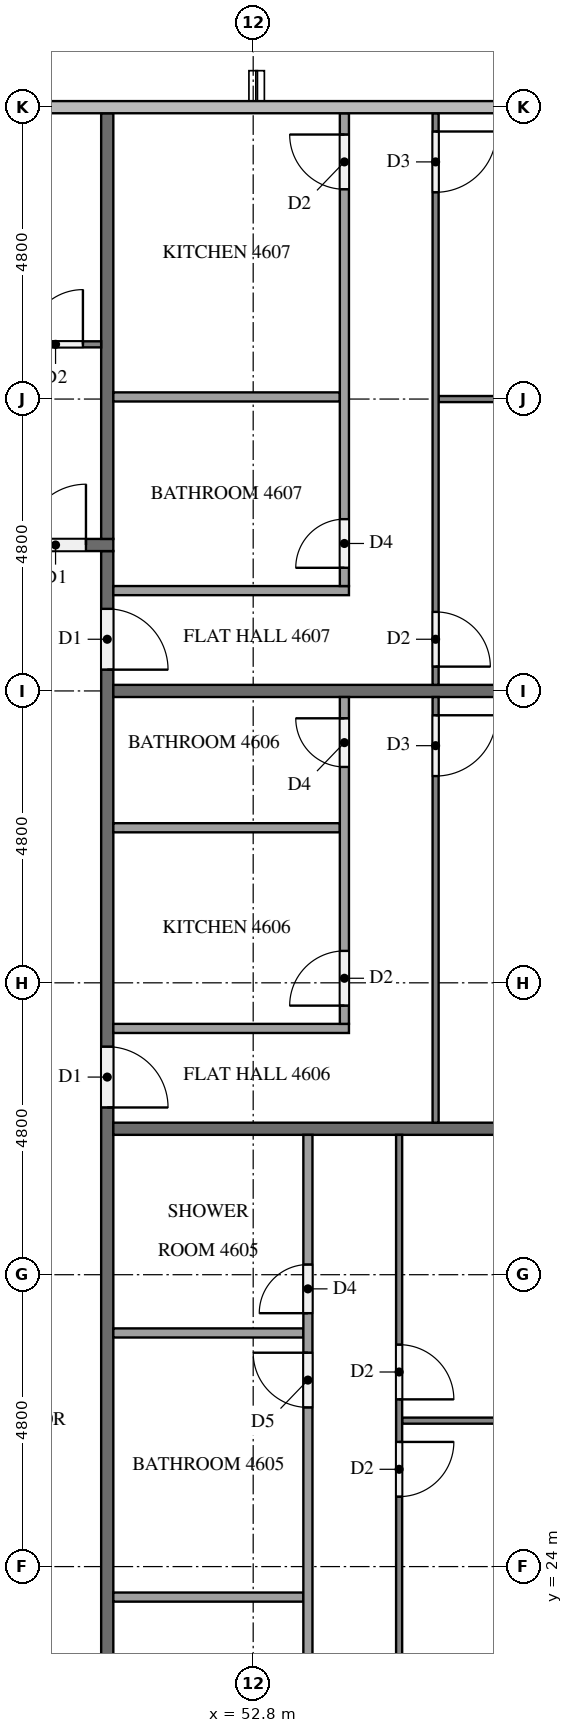
"""IFC4 building model, lengths in metres.
Left out: names, types, materials, properties, quantities, classifications, styles, units other than length and angle.
Written with IfcOpenShell. Run it as: python <this file> out.ifc"""

import sys

from ifc_helpers import new_model, si_unit, direction, frame, frame_2d, origin, place, context, subcontext, project, spatial, rectangle, extrude, element, fill, save


model = new_model("IFC4")
c1 = context("Model", 3, precision=1e-05, world=origin(), true_north=direction((0.0, 1.0)))
c2 = subcontext(c1, "Body", "Model", "MODEL_VIEW")
j1 = project(units=[si_unit("LENGTHUNIT", "METRE"), si_unit("PLANEANGLEUNIT", "RADIAN")], contexts=[c1])
p1 = place(None, origin())
s1 = spatial("IfcSite", under=j1, at=p1, CompositionType="ELEMENT")
p2 = place(p1, origin())
s2 = spatial("IfcBuilding", under=s1, at=p2, CompositionType="ELEMENT")
p3 = place(p2, frame((0.0, 0.0, 178.9)))
s3 = spatial("IfcBuildingStorey", under=s2, at=p3, CompositionType="ELEMENT", Elevation=178.9)
p4 = place(p3, frame((50.4, 40.7, 0.0), z_axis=(0.0, 0.0, 1.0), x_axis=(0.0, -1.0, 0.0)))
e1 = element("IfcWall", 1, at=p4, inside=s3, PredefinedType="PARTITIONING", context=c2, shape_type="SweptSolid", body=[
    extrude(rectangle(XDim=28.6, YDim=0.2, at=frame_2d((14.3, 0.0))), origin(), (0.0, 0.0, 1.0), 3.2),
])
p5 = place(p4, frame((27.3, 0.0, 0.0)))
e2 = element("IfcOpeningElement", 2, at=p5, cuts=e1, PredefinedType="OPENING", context=c2, shape_type="SweptSolid", body=[
    extrude(rectangle(XDim=1.1, YDim=2.1, at=frame_2d((0.55, 1.05))), frame((0.0, 0.11, 0.0), z_axis=(0.0, -1.0, 0.0), x_axis=(1.0, 0.0, 0.0)), (0.0, 0.0, 1.0), 0.22),
])
p6 = place(p4, frame((8.15, 0.0, 0.0)))
e3 = element("IfcOpeningElement", 3, at=p6, cuts=e1, PredefinedType="OPENING", context=c2, shape_type="SweptSolid", body=[
    extrude(rectangle(XDim=1.0, YDim=2.1, at=frame_2d((0.5, 1.05))), frame((0.0, 0.11, 0.0), z_axis=(0.0, -1.0, 0.0), x_axis=(1.0, 0.0, 0.0)), (0.0, 0.0, 1.0), 0.22),
])
p7 = place(p4, frame((0.95, 0.0, 0.0)))
e4 = element("IfcOpeningElement", 4, at=p7, cuts=e1, PredefinedType="OPENING", context=c2, shape_type="SweptSolid", body=[
    extrude(rectangle(XDim=1.0, YDim=2.1, at=frame_2d((0.5, 1.05))), frame((0.0, 0.11, 0.0), z_axis=(0.0, -1.0, 0.0), x_axis=(1.0, 0.0, 0.0)), (0.0, 0.0, 1.0), 0.22),
])
p8 = place(p3, frame((11.9, 40.8, 0.0), z_axis=(0.0, 0.0, 1.0), x_axis=(1.0, 0.0, 0.0)))
e5 = element("IfcWall", 5, at=p8, inside=s3, PredefinedType="PARTITIONING", context=c2, shape_type="SweptSolid", body=[
    extrude(rectangle(XDim=38.6, YDim=0.2, at=frame_2d((19.3, 0.0))), origin(), (0.0, 0.0, 1.0), 3.2),
])
p9 = place(p8, frame((37.15, 0.0, 0.0)))
e6 = element("IfcOpeningElement", 6, at=p9, cuts=e5, PredefinedType="OPENING", context=c2, shape_type="SweptSolid", body=[
    extrude(rectangle(XDim=1.0, YDim=2.1, at=frame_2d((0.5, 1.05))), frame((0.0, 0.11, 0.0), z_axis=(0.0, -1.0, 0.0), x_axis=(1.0, 0.0, 0.0)), (0.0, 0.0, 1.0), 0.22),
])
p10 = place(p8, frame((20.35, 0.0, 0.0)))
e7 = element("IfcOpeningElement", 7, at=p10, cuts=e5, PredefinedType="OPENING", context=c2, shape_type="SweptSolid", body=[
    extrude(rectangle(XDim=1.0, YDim=2.1, at=frame_2d((0.5, 1.05))), frame((0.0, 0.11, 0.0), z_axis=(0.0, -1.0, 0.0), x_axis=(1.0, 0.0, 0.0)), (0.0, 0.0, 1.0), 0.22),
])
p11 = place(p8, frame((13.15, 0.0, 0.0)))
e8 = element("IfcOpeningElement", 8, at=p11, cuts=e5, PredefinedType="OPENING", context=c2, shape_type="SweptSolid", body=[
    extrude(rectangle(XDim=1.0, YDim=2.1, at=frame_2d((0.5, 1.05))), frame((0.0, 0.11, 0.0), z_axis=(0.0, -1.0, 0.0), x_axis=(1.0, 0.0, 0.0)), (0.0, 0.0, 1.0), 0.22),
])
for number, where, z_axis, x_axis in (
    (9, (50.5, 31.2, 0.0), (0.0, 0.0, 1.0), (1.0, 0.0, 0.0)),
    (10, (50.5, 38.4, 0.0), (0.0, 0.0, 1.0), (1.0, 0.0, 0.0)),
):
    element("IfcWall", number, at=place(p3, frame(where, z_axis=z_axis, x_axis=x_axis)), inside=s3, PredefinedType="PARTITIONING", context=c2, shape_type="SweptSolid", body=[
        extrude(rectangle(XDim=11.8, YDim=0.2, at=frame_2d((5.9, 0.0))), origin(), (0.0, 0.0, 1.0), 3.2),
    ])
p12 = place(p3, frame((50.4, 40.9, 0.0), z_axis=(0.0, 0.0, 1.0), x_axis=(0.0, 1.0, 0.0)))
e11 = element("IfcWall", 11, at=p12, inside=s3, PredefinedType="PARTITIONING", context=c2, shape_type="SweptSolid", body=[
    extrude(rectangle(XDim=7.0, YDim=0.2, at=frame_2d((3.5, 0.0))), origin(), (0.0, 0.0, 1.0), 3.2),
])
p13 = place(p3, frame((55.25, 26.4, 0.0), z_axis=(0.0, 0.0, 1.0), x_axis=(1.0, 0.0, 0.0)))
e12 = element("IfcWall", 12, at=p13, inside=s3, PredefinedType="PARTITIONING", context=c2, shape_type="SweptSolid", body=[
    extrude(rectangle(XDim=7.05, YDim=0.1, at=frame_2d((3.525, 0.0))), origin(), (0.0, 0.0, 1.0), 3.2),
])
p14 = place(p3, frame((55.2, 31.1, 0.0), z_axis=(0.0, 0.0, 1.0), x_axis=(0.0, -1.0, 0.0)))
e13 = element("IfcWall", 13, at=p14, inside=s3, PredefinedType="PARTITIONING", context=c2, shape_type="SweptSolid", body=[
    extrude(rectangle(XDim=19.0, YDim=0.1, at=frame_2d((9.5, 0.0))), origin(), (0.0, 0.0, 1.0), 3.2),
])
p15 = place(p14, frame((14.65, 0.0, 0.0)))
e14 = element("IfcOpeningElement", 14, at=p15, cuts=e13, PredefinedType="OPENING", context=c2, shape_type="SweptSolid", body=[
    extrude(rectangle(XDim=0.9, YDim=2.1, at=frame_2d((0.45, 1.05))), frame((0.0, 0.06, 0.0), z_axis=(0.0, -1.0, 0.0), x_axis=(1.0, 0.0, 0.0)), (0.0, 0.0, 1.0), 0.12),
])
p16 = place(p14, frame((12.95, 0.0, 0.0)))
e15 = element("IfcOpeningElement", 15, at=p16, cuts=e13, PredefinedType="OPENING", context=c2, shape_type="SweptSolid", body=[
    extrude(rectangle(XDim=1.0, YDim=2.1, at=frame_2d((0.5, 1.05))), frame((0.0, 0.06, 0.0), z_axis=(0.0, -1.0, 0.0), x_axis=(1.0, 0.0, 0.0)), (0.0, 0.0, 1.0), 0.12),
])
p17 = place(p14, frame((5.05, 0.0, 0.0)))
e16 = element("IfcOpeningElement", 16, at=p17, cuts=e13, PredefinedType="OPENING", context=c2, shape_type="SweptSolid", body=[
    extrude(rectangle(XDim=0.9, YDim=2.1, at=frame_2d((0.45, 1.05))), frame((0.0, 0.06, 0.0), z_axis=(0.0, -1.0, 0.0), x_axis=(1.0, 0.0, 0.0)), (0.0, 0.0, 1.0), 0.12),
])
p18 = place(p14, frame((3.45, 0.0, 0.0)))
e17 = element("IfcOpeningElement", 17, at=p18, cuts=e13, PredefinedType="OPENING", context=c2, shape_type="SweptSolid", body=[
    extrude(rectangle(XDim=0.9, YDim=2.1, at=frame_2d((0.45, 1.05))), frame((0.0, 0.06, 0.0), z_axis=(0.0, -1.0, 0.0), x_axis=(1.0, 0.0, 0.0)), (0.0, 0.0, 1.0), 0.12),
])
for number, where, z_axis, x_axis in (
    (18, (50.5, 23.498, 0.0), (0.0, 0.0, 1.0), (1.0, 0.0, 0.0)),
    (19, (50.5, 27.842, 0.0), (0.0, 0.0, 1.0), (1.0, 0.0, 0.0)),
):
    element("IfcWall", number, at=place(p3, frame(where, z_axis=z_axis, x_axis=x_axis)), inside=s3, PredefinedType="PARTITIONING", context=c2, shape_type="SweptSolid", body=[
        extrude(rectangle(XDim=3.125, YDim=0.15, at=frame_2d((1.562, 0.0))), origin(), (0.0, 0.0, 1.0), 3.2),
    ])
p19 = place(p3, frame((53.7, 13.725, 0.0), z_axis=(0.0, 0.0, 1.0), x_axis=(0.0, 1.0, 0.0)))
e20 = element("IfcWall", 20, at=p19, inside=s3, PredefinedType="PARTITIONING", context=c2, shape_type="SweptSolid", body=[
    extrude(rectangle(XDim=17.375, YDim=0.15, at=frame_2d((8.688, 0.0))), origin(), (0.0, 0.0, 1.0), 3.2),
])
p20 = place(p19, frame((2.133, 0.0, 0.0)))
e21 = element("IfcOpeningElement", 21, at=p20, cuts=e20, PredefinedType="OPENING", context=c2, shape_type="SweptSolid", body=[
    extrude(rectangle(XDim=0.8, YDim=2.1, at=frame_2d((0.4, 1.05))), frame((0.0, 0.085, 0.0), z_axis=(0.0, -1.0, 0.0), x_axis=(1.0, 0.0, 0.0)), (0.0, 0.0, 1.0), 0.17),
])
p21 = place(p19, frame((3.583, 0.0, 0.0)))
e22 = element("IfcOpeningElement", 22, at=p21, cuts=e20, PredefinedType="OPENING", context=c2, shape_type="SweptSolid", body=[
    extrude(rectangle(XDim=0.9, YDim=2.1, at=frame_2d((0.45, 1.05))), frame((0.0, 0.085, 0.0), z_axis=(0.0, -1.0, 0.0), x_axis=(1.0, 0.0, 0.0)), (0.0, 0.0, 1.0), 0.17),
])
p22 = place(p19, frame((12.892, 0.0, 0.0)))
e23 = element("IfcOpeningElement", 23, at=p22, cuts=e20, PredefinedType="OPENING", context=c2, shape_type="SweptSolid", body=[
    extrude(rectangle(XDim=0.9, YDim=2.1, at=frame_2d((0.45, 1.05))), frame((0.0, 0.085, 0.0), z_axis=(0.0, -1.0, 0.0), x_axis=(1.0, 0.0, 0.0)), (0.0, 0.0, 1.0), 0.17),
])
p23 = place(p19, frame((14.442, 0.0, 0.0)))
e24 = element("IfcOpeningElement", 24, at=p23, cuts=e20, PredefinedType="OPENING", context=c2, shape_type="SweptSolid", body=[
    extrude(rectangle(XDim=0.8, YDim=2.1, at=frame_2d((0.4, 1.05))), frame((0.0, 0.085, 0.0), z_axis=(0.0, -1.0, 0.0), x_axis=(1.0, 0.0, 0.0)), (0.0, 0.0, 1.0), 0.17),
])
p24 = place(p3, frame((55.8, 38.3, 0.0), z_axis=(0.0, 0.0, 1.0), x_axis=(0.0, -1.0, 0.0)))
e25 = element("IfcWall", 25, at=p24, inside=s3, PredefinedType="PARTITIONING", context=c2, shape_type="SweptSolid", body=[
    extrude(rectangle(XDim=7.0, YDim=0.1, at=frame_2d((3.5, 0.0))), origin(), (0.0, 0.0, 1.0), 3.2),
])
p25 = place(p24, frame((0.3, 0.0, 0.0)))
e26 = element("IfcOpeningElement", 26, at=p25, cuts=e25, PredefinedType="OPENING", context=c2, shape_type="SweptSolid", body=[
    extrude(rectangle(XDim=1.0, YDim=2.1, at=frame_2d((0.5, 1.05))), frame((0.0, 0.06, 0.0), z_axis=(0.0, -1.0, 0.0), x_axis=(1.0, 0.0, 0.0)), (0.0, 0.0, 1.0), 0.12),
])
p26 = place(p3, frame((50.5, 36.15, 0.0), z_axis=(0.0, 0.0, 1.0), x_axis=(1.0, 0.0, 0.0)))
e27 = element("IfcWall", 27, at=p26, inside=s3, PredefinedType="PARTITIONING", context=c2, shape_type="SweptSolid", body=[
    extrude(rectangle(XDim=3.725, YDim=0.15, at=frame_2d((1.863, 0.0))), origin(), (0.0, 0.0, 1.0), 3.2),
])
p27 = place(p3, frame((50.5, 32.85, 0.0), z_axis=(0.0, 0.0, 1.0), x_axis=(1.0, 0.0, 0.0)))
e28 = element("IfcWall", 28, at=p27, inside=s3, PredefinedType="PARTITIONING", context=c2, shape_type="SweptSolid", body=[
    extrude(rectangle(XDim=3.875, YDim=0.15, at=frame_2d((1.938, 0.0))), origin(), (0.0, 0.0, 1.0), 3.2),
])
p28 = place(p3, frame((54.3, 32.925, 0.0), z_axis=(0.0, 0.0, 1.0), x_axis=(0.0, 1.0, 0.0)))
e29 = element("IfcWall", 29, at=p28, inside=s3, PredefinedType="PARTITIONING", context=c2, shape_type="SweptSolid", body=[
    extrude(rectangle(XDim=5.375, YDim=0.15, at=frame_2d((2.688, 0.0))), origin(), (0.0, 0.0, 1.0), 3.2),
])
p29 = place(p28, frame((0.3, 0.0, 0.0)))
e30 = element("IfcOpeningElement", 30, at=p29, cuts=e29, PredefinedType="OPENING", context=c2, shape_type="SweptSolid", body=[
    extrude(rectangle(XDim=0.9, YDim=2.1, at=frame_2d((0.45, 1.05))), frame((0.0, 0.085, 0.0), z_axis=(0.0, -1.0, 0.0), x_axis=(1.0, 0.0, 0.0)), (0.0, 0.0, 1.0), 0.17),
])
p30 = place(p28, frame((4.225, 0.0, 0.0)))
e31 = element("IfcOpeningElement", 31, at=p30, cuts=e29, PredefinedType="OPENING", context=c2, shape_type="SweptSolid", body=[
    extrude(rectangle(XDim=0.8, YDim=2.1, at=frame_2d((0.4, 1.05))), frame((0.0, 0.085, 0.0), z_axis=(0.0, -1.0, 0.0), x_axis=(1.0, 0.0, 0.0)), (0.0, 0.0, 1.0), 0.17),
])
p31 = place(p3, frame((55.85, 43.2, 0.0), z_axis=(0.0, 0.0, 1.0), x_axis=(1.0, 0.0, 0.0)))
e32 = element("IfcWall", 32, at=p31, inside=s3, PredefinedType="PARTITIONING", context=c2, shape_type="SweptSolid", body=[
    extrude(rectangle(XDim=6.075, YDim=0.1, at=frame_2d((3.038, 0.0))), origin(), (0.0, 0.0, 1.0), 3.2),
])
p32 = place(p3, frame((55.8, 47.9, 0.0), z_axis=(0.0, 0.0, 1.0), x_axis=(0.0, -1.0, 0.0)))
e33 = element("IfcWall", 33, at=p32, inside=s3, PredefinedType="PARTITIONING", context=c2, shape_type="SweptSolid", body=[
    extrude(rectangle(XDim=9.4, YDim=0.1, at=frame_2d((4.7, 0.0))), origin(), (0.0, 0.0, 1.0), 3.2),
])
p33 = place(p32, frame((8.2, 0.0, 0.0)))
e34 = element("IfcOpeningElement", 34, at=p33, cuts=e33, PredefinedType="OPENING", context=c2, shape_type="SweptSolid", body=[
    extrude(rectangle(XDim=0.9, YDim=2.1, at=frame_2d((0.45, 1.05))), frame((0.0, 0.06, 0.0), z_axis=(0.0, -1.0, 0.0), x_axis=(1.0, 0.0, 0.0)), (0.0, 0.0, 1.0), 0.12),
])
p34 = place(p32, frame((0.3, 0.0, 0.0)))
e35 = element("IfcOpeningElement", 35, at=p34, cuts=e33, PredefinedType="OPENING", context=c2, shape_type="SweptSolid", body=[
    extrude(rectangle(XDim=1.0, YDim=2.1, at=frame_2d((0.5, 1.05))), frame((0.0, 0.06, 0.0), z_axis=(0.0, -1.0, 0.0), x_axis=(1.0, 0.0, 0.0)), (0.0, 0.0, 1.0), 0.12),
])
p35 = place(p3, frame((50.5, 43.235, 0.0), z_axis=(0.0, 0.0, 1.0), x_axis=(1.0, 0.0, 0.0)))
e36 = element("IfcWall", 36, at=p35, inside=s3, PredefinedType="PARTITIONING", context=c2, shape_type="SweptSolid", body=[
    extrude(rectangle(XDim=3.725, YDim=0.15, at=frame_2d((1.863, 0.0))), origin(), (0.0, 0.0, 1.0), 3.2),
])
p36 = place(p3, frame((50.5, 40.05, 0.0), z_axis=(0.0, 0.0, 1.0), x_axis=(1.0, 0.0, 0.0)))
e37 = element("IfcWall", 37, at=p36, inside=s3, PredefinedType="PARTITIONING", context=c2, shape_type="SweptSolid", body=[
    extrude(rectangle(XDim=3.875, YDim=0.15, at=frame_2d((1.938, 0.0))), origin(), (0.0, 0.0, 1.0), 3.2),
])
p37 = place(p3, frame((54.3, 40.125, 0.0), z_axis=(0.0, 0.0, 1.0), x_axis=(0.0, 1.0, 0.0)))
e38 = element("IfcWall", 38, at=p37, inside=s3, PredefinedType="PARTITIONING", context=c2, shape_type="SweptSolid", body=[
    extrude(rectangle(XDim=7.775, YDim=0.15, at=frame_2d((3.887, 0.0))), origin(), (0.0, 0.0, 1.0), 3.2),
])
p38 = place(p37, frame((0.3, 0.0, 0.0)))
e39 = element("IfcOpeningElement", 39, at=p38, cuts=e38, PredefinedType="OPENING", context=c2, shape_type="SweptSolid", body=[
    extrude(rectangle(XDim=0.8, YDim=2.1, at=frame_2d((0.4, 1.05))), frame((0.0, 0.085, 0.0), z_axis=(0.0, -1.0, 0.0), x_axis=(1.0, 0.0, 0.0)), (0.0, 0.0, 1.0), 0.17),
])
p39 = place(p37, frame((6.525, 0.0, 0.0)))
e40 = element("IfcOpeningElement", 40, at=p39, cuts=e38, PredefinedType="OPENING", context=c2, shape_type="SweptSolid", body=[
    extrude(rectangle(XDim=0.9, YDim=2.1, at=frame_2d((0.45, 1.05))), frame((0.0, 0.085, 0.0), z_axis=(0.0, -1.0, 0.0), x_axis=(1.0, 0.0, 0.0)), (0.0, 0.0, 1.0), 0.17),
])
p40 = place(p3, frame((33.7, 44.1, 0.0), z_axis=(0.0, 0.0, 1.0), x_axis=(1.0, 0.0, 0.0)))
e41 = element("IfcWall", 41, at=p40, inside=s3, PredefinedType="PARTITIONING", context=c2, shape_type="SweptSolid", body=[
    extrude(rectangle(XDim=16.6, YDim=0.1, at=frame_2d((8.3, 0.0))), origin(), (0.0, 0.0, 1.0), 3.2),
])
p41 = place(p40, frame((15.4, 0.0, 0.0)))
e42 = element("IfcOpeningElement", 42, at=p41, cuts=e41, PredefinedType="OPENING", context=c2, shape_type="SweptSolid", body=[
    extrude(rectangle(XDim=0.9, YDim=2.1, at=frame_2d((0.45, 1.05))), frame((0.0, 0.06, 0.0), z_axis=(0.0, -1.0, 0.0), x_axis=(1.0, 0.0, 0.0)), (0.0, 0.0, 1.0), 0.12),
])
p42 = place(p40, frame((7.45, 0.0, 0.0)))
e43 = element("IfcOpeningElement", 43, at=p42, cuts=e41, PredefinedType="OPENING", context=c2, shape_type="SweptSolid", body=[
    extrude(rectangle(XDim=0.9, YDim=2.1, at=frame_2d((0.45, 1.05))), frame((0.0, 0.06, 0.0), z_axis=(0.0, -1.0, 0.0), x_axis=(1.0, 0.0, 0.0)), (0.0, 0.0, 1.0), 0.12),
])
p43 = place(p40, frame((5.75, 0.0, 0.0)))
e44 = element("IfcOpeningElement", 44, at=p43, cuts=e41, PredefinedType="OPENING", context=c2, shape_type="SweptSolid", body=[
    extrude(rectangle(XDim=1.0, YDim=2.1, at=frame_2d((0.5, 1.05))), frame((0.0, 0.06, 0.0), z_axis=(0.0, -1.0, 0.0), x_axis=(1.0, 0.0, 0.0)), (0.0, 0.0, 1.0), 0.12),
])
p44 = place(p6, origin())
e45 = element("IfcDoor", 45, at=p44, inside=s3, OperationType="SINGLE_SWING_RIGHT", PredefinedType="DOOR", context=c2, shape_type="SweptSolid", body=[
    extrude(rectangle(XDim=1.0, YDim=2.1, at=frame_2d((0.5, 1.05))), frame((0.0, 0.025, 0.0), z_axis=(0.0, -1.0, 0.0), x_axis=(1.0, 0.0, 0.0)), (0.0, 0.0, 1.0), 0.05),
])
fill(e3, e45)
p45 = place(p7, origin())
e46 = element("IfcDoor", 46, at=p45, inside=s3, OperationType="SINGLE_SWING_RIGHT", PredefinedType="DOOR", context=c2, shape_type="SweptSolid", body=[
    extrude(rectangle(XDim=1.0, YDim=2.1, at=frame_2d((0.5, 1.05))), frame((0.0, 0.025, 0.0), z_axis=(0.0, -1.0, 0.0), x_axis=(1.0, 0.0, 0.0)), (0.0, 0.0, 1.0), 0.05),
])
fill(e4, e46)
p46 = place(p9, origin())
e47 = element("IfcDoor", 47, at=p46, inside=s3, OperationType="SINGLE_SWING_RIGHT", PredefinedType="DOOR", context=c2, shape_type="SweptSolid", body=[
    extrude(rectangle(XDim=1.0, YDim=2.1, at=frame_2d((0.5, 1.05))), frame((0.0, 0.025, 0.0), z_axis=(0.0, -1.0, 0.0), x_axis=(1.0, 0.0, 0.0)), (0.0, 0.0, 1.0), 0.05),
])
fill(e6, e47)
p47 = place(p17, origin())
e48 = element("IfcDoor", 48, at=p47, inside=s3, OperationType="SINGLE_SWING_LEFT", PredefinedType="DOOR", context=c2, shape_type="SweptSolid", body=[
    extrude(rectangle(XDim=0.9, YDim=2.1, at=frame_2d((0.45, 1.05))), frame((0.0, 0.025, 0.0), z_axis=(0.0, -1.0, 0.0), x_axis=(1.0, 0.0, 0.0)), (0.0, 0.0, 1.0), 0.05),
])
fill(e16, e48)
p48 = place(p18, origin())
e49 = element("IfcDoor", 49, at=p48, inside=s3, OperationType="SINGLE_SWING_RIGHT", PredefinedType="DOOR", context=c2, shape_type="SweptSolid", body=[
    extrude(rectangle(XDim=0.9, YDim=2.1, at=frame_2d((0.45, 1.05))), frame((0.0, 0.025, 0.0), z_axis=(0.0, -1.0, 0.0), x_axis=(1.0, 0.0, 0.0)), (0.0, 0.0, 1.0), 0.05),
])
fill(e17, e49)
p49 = place(p22, origin())
e50 = element("IfcDoor", 50, at=p49, inside=s3, OperationType="SINGLE_SWING_RIGHT", PredefinedType="DOOR", context=c2, shape_type="SweptSolid", body=[
    extrude(rectangle(XDim=0.9, YDim=2.1, at=frame_2d((0.45, 1.05))), frame((0.0, 0.025, 0.0), z_axis=(0.0, -1.0, 0.0), x_axis=(1.0, 0.0, 0.0)), (0.0, 0.0, 1.0), 0.05),
])
fill(e23, e50)
p50 = place(p23, origin())
e51 = element("IfcDoor", 51, at=p50, inside=s3, OperationType="SINGLE_SWING_LEFT", PredefinedType="DOOR", context=c2, shape_type="SweptSolid", body=[
    extrude(rectangle(XDim=0.8, YDim=2.1, at=frame_2d((0.4, 1.05))), frame((0.0, 0.025, 0.0), z_axis=(0.0, -1.0, 0.0), x_axis=(1.0, 0.0, 0.0)), (0.0, 0.0, 1.0), 0.05),
])
fill(e24, e51)
p51 = place(p25, origin())
e52 = element("IfcDoor", 52, at=p51, inside=s3, OperationType="SINGLE_SWING_LEFT", PredefinedType="DOOR", context=c2, shape_type="SweptSolid", body=[
    extrude(rectangle(XDim=1.0, YDim=2.1, at=frame_2d((0.5, 1.05))), frame((0.0, 0.025, 0.0), z_axis=(0.0, -1.0, 0.0), x_axis=(1.0, 0.0, 0.0)), (0.0, 0.0, 1.0), 0.05),
])
fill(e26, e52)
p52 = place(p29, origin())
e53 = element("IfcDoor", 53, at=p52, inside=s3, OperationType="SINGLE_SWING_LEFT", PredefinedType="DOOR", context=c2, shape_type="SweptSolid", body=[
    extrude(rectangle(XDim=0.9, YDim=2.1, at=frame_2d((0.45, 1.05))), frame((0.0, 0.025, 0.0), z_axis=(0.0, -1.0, 0.0), x_axis=(1.0, 0.0, 0.0)), (0.0, 0.0, 1.0), 0.05),
])
fill(e30, e53)
p53 = place(p30, origin())
e54 = element("IfcDoor", 54, at=p53, inside=s3, OperationType="SINGLE_SWING_RIGHT", PredefinedType="DOOR", context=c2, shape_type="SweptSolid", body=[
    extrude(rectangle(XDim=0.8, YDim=2.1, at=frame_2d((0.4, 1.05))), frame((0.0, 0.025, 0.0), z_axis=(0.0, -1.0, 0.0), x_axis=(1.0, 0.0, 0.0)), (0.0, 0.0, 1.0), 0.05),
])
fill(e31, e54)
p54 = place(p33, origin())
e55 = element("IfcDoor", 55, at=p54, inside=s3, OperationType="SINGLE_SWING_RIGHT", PredefinedType="DOOR", context=c2, shape_type="SweptSolid", body=[
    extrude(rectangle(XDim=0.9, YDim=2.1, at=frame_2d((0.45, 1.05))), frame((0.0, 0.025, 0.0), z_axis=(0.0, -1.0, 0.0), x_axis=(1.0, 0.0, 0.0)), (0.0, 0.0, 1.0), 0.05),
])
fill(e34, e55)
p55 = place(p34, origin())
e56 = element("IfcDoor", 56, at=p55, inside=s3, OperationType="SINGLE_SWING_LEFT", PredefinedType="DOOR", context=c2, shape_type="SweptSolid", body=[
    extrude(rectangle(XDim=1.0, YDim=2.1, at=frame_2d((0.5, 1.05))), frame((0.0, 0.025, 0.0), z_axis=(0.0, -1.0, 0.0), x_axis=(1.0, 0.0, 0.0)), (0.0, 0.0, 1.0), 0.05),
])
fill(e35, e56)
p56 = place(p38, origin())
e57 = element("IfcDoor", 57, at=p56, inside=s3, OperationType="SINGLE_SWING_LEFT", PredefinedType="DOOR", context=c2, shape_type="SweptSolid", body=[
    extrude(rectangle(XDim=0.8, YDim=2.1, at=frame_2d((0.4, 1.05))), frame((0.0, 0.025, 0.0), z_axis=(0.0, -1.0, 0.0), x_axis=(1.0, 0.0, 0.0)), (0.0, 0.0, 1.0), 0.05),
])
fill(e39, e57)
p57 = place(p39, origin())
e58 = element("IfcDoor", 58, at=p57, inside=s3, OperationType="SINGLE_SWING_RIGHT", PredefinedType="DOOR", context=c2, shape_type="SweptSolid", body=[
    extrude(rectangle(XDim=0.9, YDim=2.1, at=frame_2d((0.45, 1.05))), frame((0.0, 0.025, 0.0), z_axis=(0.0, -1.0, 0.0), x_axis=(1.0, 0.0, 0.0)), (0.0, 0.0, 1.0), 0.05),
])
fill(e40, e58)
p58 = place(p41, origin())
e59 = element("IfcDoor", 59, at=p58, inside=s3, OperationType="SINGLE_SWING_RIGHT", PredefinedType="DOOR", context=c2, shape_type="SweptSolid", body=[
    extrude(rectangle(XDim=0.9, YDim=2.1, at=frame_2d((0.45, 1.05))), frame((0.0, 0.025, 0.0), z_axis=(0.0, -1.0, 0.0), x_axis=(1.0, 0.0, 0.0)), (0.0, 0.0, 1.0), 0.05),
])
fill(e42, e59)
save(model, sys.argv[1])
